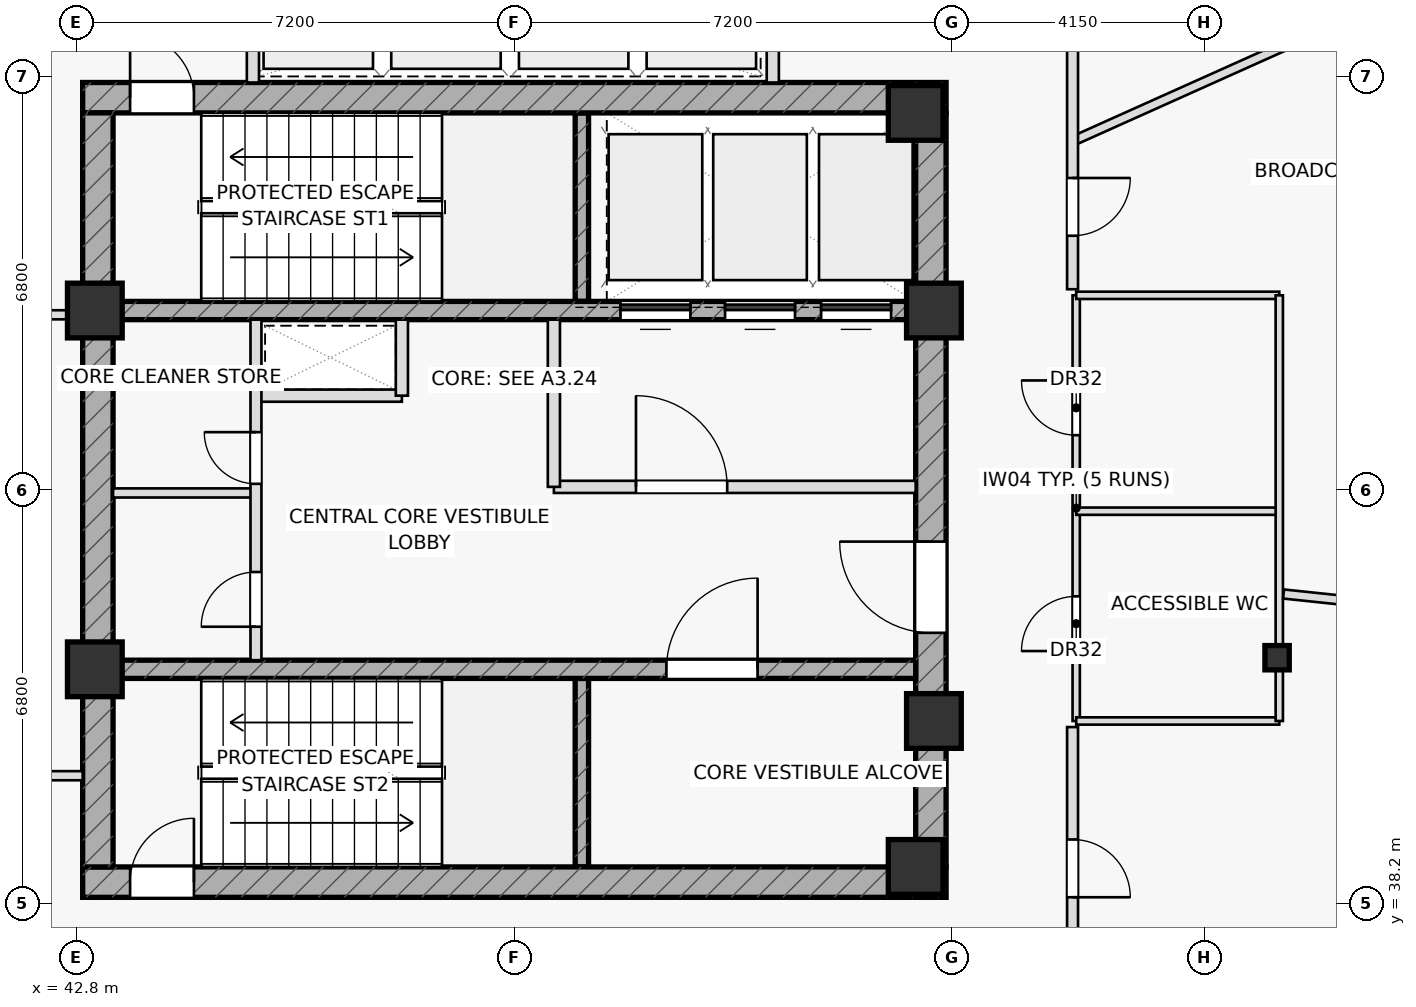
"""IFC4 building model, lengths in metres.
Left out: names, types, materials, properties, quantities, classifications, styles, units other than length and angle.
Written with IfcOpenShell. Run it as: python <this file> out.ifc"""

import sys

from ifc_helpers import new_model, si_unit, direction, frame, frame_2d, origin, origin_2d, place, context, subcontext, project, spatial, rectangle, hollow_rectangle, extrude, element, fill, save


model = new_model("IFC4")
c1 = context("Model", 3, precision=1e-05, world=origin(), true_north=direction((0.0, 1.0)))
c2 = subcontext(c1, "Body", "Model", "MODEL_VIEW")
j1 = project(units=[si_unit("LENGTHUNIT", "METRE"), si_unit("PLANEANGLEUNIT", "RADIAN")], contexts=[c1])
p1 = place(None, origin())
s1 = spatial("IfcSite", under=j1, at=p1, CompositionType="ELEMENT")
p2 = place(p1, origin())
s2 = spatial("IfcBuilding", under=s1, at=p2, CompositionType="ELEMENT")
p3 = place(p2, frame((0.0, 0.0, 309.5)))
s3 = spatial("IfcBuildingStorey", under=s2, at=p3, CompositionType="ELEMENT", Elevation=309.5)
for number, where, z_axis, x_axis in (
    (1, (51.11, 48.1, 0.0), (0.0, 0.0, 1.0), (0.0, 1.0, 0.0)),
    (2, (51.11, 38.8, 0.0), (0.0, 0.0, 1.0), (0.0, 1.0, 0.0)),
):
    element("IfcWall", number, at=place(p3, frame(where, z_axis=z_axis, x_axis=x_axis)), inside=s3, PredefinedType="SHEAR", context=c2, shape_type="SweptSolid", body=[
        extrude(rectangle(XDim=3.1, YDim=0.22, at=frame_2d((1.55, 0.0))), origin(), (0.0, 0.0, 1.0), 3.7),
    ])
p4 = place(p3, frame((42.9, 51.45, 0.0), z_axis=(0.0, 0.0, 1.0), x_axis=(1.0, 0.0, 0.0)))
e3 = element("IfcWall", 3, at=p4, inside=s3, PredefinedType="SHEAR", context=c2, shape_type="SweptSolid", body=[
    extrude(rectangle(XDim=14.2, YDim=0.5, at=frame_2d((7.1, 0.0))), origin(), (0.0, 0.0, 1.0), 3.7),
])
p5 = place(p4, frame((0.78, 0.0, 0.0)))
e4 = element("IfcOpeningElement", 4, at=p5, cuts=e3, PredefinedType="OPENING", context=c2, shape_type="SweptSolid", body=[
    extrude(rectangle(XDim=1.05, YDim=2.2, at=frame_2d((0.525, 1.1))), frame((0.0, 0.26, 0.0), z_axis=(0.0, -1.0, 0.0), x_axis=(1.0, 0.0, 0.0)), (0.0, 0.0, 1.0), 0.52),
])
p6 = place(p3, frame((42.9, 38.55, 0.0), z_axis=(0.0, 0.0, 1.0), x_axis=(1.0, 0.0, 0.0)))
e5 = element("IfcWall", 5, at=p6, inside=s3, PredefinedType="SHEAR", context=c2, shape_type="SweptSolid", body=[
    extrude(rectangle(XDim=14.2, YDim=0.5, at=frame_2d((7.1, 0.0))), origin(), (0.0, 0.0, 1.0), 3.7),
])
p7 = place(p6, frame((0.78, 0.0, 0.0)))
e6 = element("IfcOpeningElement", 6, at=p7, cuts=e5, PredefinedType="OPENING", context=c2, shape_type="SweptSolid", body=[
    extrude(rectangle(XDim=1.05, YDim=2.2, at=frame_2d((0.525, 1.1))), frame((0.0, 0.26, 0.0), z_axis=(0.0, -1.0, 0.0), x_axis=(1.0, 0.0, 0.0)), (0.0, 0.0, 1.0), 0.52),
])
p8 = place(p3, frame((43.15, 38.8, 0.0), z_axis=(0.0, 0.0, 1.0), x_axis=(0.0, 1.0, 0.0)))
e7 = element("IfcWall", 7, at=p8, inside=s3, PredefinedType="SHEAR", context=c2, shape_type="SweptSolid", body=[
    extrude(rectangle(XDim=12.4, YDim=0.5, at=frame_2d((6.2, 0.0))), origin(), (0.0, 0.0, 1.0), 3.7),
])
p9 = place(p3, frame((56.85, 38.8, 0.0), z_axis=(0.0, 0.0, 1.0), x_axis=(0.0, 1.0, 0.0)))
e8 = element("IfcWall", 8, at=p9, inside=s3, PredefinedType="SHEAR", context=c2, shape_type="SweptSolid", body=[
    extrude(rectangle(XDim=12.4, YDim=0.5, at=frame_2d((6.2, 0.0))), origin(), (0.0, 0.0, 1.0), 3.7),
])
p10 = place(p9, frame((3.85, 0.0, 0.0)))
e9 = element("IfcOpeningElement", 9, at=p10, cuts=e8, PredefinedType="OPENING", context=c2, shape_type="SweptSolid", body=[
    extrude(rectangle(XDim=1.5, YDim=2.2, at=frame_2d((0.75, 1.1))), frame((0.0, 0.26, 0.0), z_axis=(0.0, -1.0, 0.0), x_axis=(1.0, 0.0, 0.0)), (0.0, 0.0, 1.0), 0.52),
])
p11 = place(p3, frame((43.4, 47.95, 0.0), z_axis=(0.0, 0.0, 1.0), x_axis=(1.0, 0.0, 0.0)))
e10 = element("IfcWall", 10, at=p11, inside=s3, PredefinedType="SHEAR", context=c2, shape_type="SweptSolid", body=[
    extrude(rectangle(XDim=13.2, YDim=0.3, at=frame_2d((6.6, 0.0))), origin(), (0.0, 0.0, 1.0), 3.7),
])
p12 = place(p11, frame((8.345, 0.0, 0.0)))
e11 = element("IfcOpeningElement", 11, at=p12, cuts=e10, PredefinedType="OPENING", context=c2, shape_type="SweptSolid", body=[
    extrude(rectangle(XDim=1.15, YDim=2.2, at=frame_2d((0.575, 1.1))), frame((0.0, 0.16, 0.0), z_axis=(0.0, -1.0, 0.0), x_axis=(1.0, 0.0, 0.0)), (0.0, 0.0, 1.0), 0.32),
])
p13 = place(p11, frame((10.065, 0.0, 0.0)))
e12 = element("IfcOpeningElement", 12, at=p13, cuts=e10, PredefinedType="OPENING", context=c2, shape_type="SweptSolid", body=[
    extrude(rectangle(XDim=1.15, YDim=2.2, at=frame_2d((0.575, 1.1))), frame((0.0, 0.16, 0.0), z_axis=(0.0, -1.0, 0.0), x_axis=(1.0, 0.0, 0.0)), (0.0, 0.0, 1.0), 0.32),
])
p14 = place(p11, frame((11.645, 0.0, 0.0)))
e13 = element("IfcOpeningElement", 13, at=p14, cuts=e10, PredefinedType="OPENING", context=c2, shape_type="SweptSolid", body=[
    extrude(rectangle(XDim=1.15, YDim=2.2, at=frame_2d((0.575, 1.1))), frame((0.0, 0.16, 0.0), z_axis=(0.0, -1.0, 0.0), x_axis=(1.0, 0.0, 0.0)), (0.0, 0.0, 1.0), 0.32),
])
p15 = place(p3, frame((43.4, 42.05, 0.0), z_axis=(0.0, 0.0, 1.0), x_axis=(1.0, 0.0, 0.0)))
e14 = element("IfcWall", 14, at=p15, inside=s3, PredefinedType="SHEAR", context=c2, shape_type="SweptSolid", body=[
    extrude(rectangle(XDim=13.2, YDim=0.3, at=frame_2d((6.6, 0.0))), origin(), (0.0, 0.0, 1.0), 3.7),
])
p16 = place(p15, frame((9.1, 0.0, 0.0)))
e15 = element("IfcOpeningElement", 15, at=p16, cuts=e14, PredefinedType="OPENING", context=c2, shape_type="SweptSolid", body=[
    extrude(rectangle(XDim=1.5, YDim=2.2, at=frame_2d((0.75, 1.1))), frame((0.0, 0.16, 0.0), z_axis=(0.0, -1.0, 0.0), x_axis=(1.0, 0.0, 0.0)), (0.0, 0.0, 1.0), 0.32),
])
for number, where, z_axis, x_axis in (
    (16, (43.1, 47.95, 0.0), (0.0, 0.0, 1.0), (1.0, 0.0, 0.0)),
    (17, (56.9, 47.95, 0.0), (0.0, 0.0, 1.0), (1.0, 0.0, 0.0)),
    (18, (56.6, 51.2, 0.0), (0.0, 0.0, 1.0), (1.0, 0.0, 0.0)),
    (19, (43.1, 42.05, 0.0), (0.0, 0.0, 1.0), (1.0, 0.0, 0.0)),
    (20, (56.9, 41.2, 0.0), (0.0, 0.0, 1.0), (1.0, 0.0, 0.0)),
    (21, (56.6, 38.8, 0.0), (0.0, 0.0, 1.0), (1.0, 0.0, 0.0)),
):
    element("IfcColumn", number, at=place(p3, frame(where, z_axis=z_axis, x_axis=x_axis)), inside=s3, PredefinedType="COLUMN", context=c2, shape_type="SweptSolid", body=[
        extrude(rectangle(XDim=0.9, YDim=0.9, at=origin_2d()), origin(), (0.0, 0.0, 1.0), 3.7),
    ])
p17 = place(p3, frame((62.544, 42.24, 0.0), z_axis=(0.0, 0.0, 1.0), x_axis=(1.0, 0.0, 0.0)))
e22 = element("IfcColumn", 22, at=p17, inside=s3, PredefinedType="COLUMN", context=c2, shape_type="SweptSolid", body=[
    extrude(hollow_rectangle(XDim=0.4, YDim=0.4, WallThickness=0.025, at=origin_2d()), origin(), (0.0, 0.0, 1.0), 3.7),
])
for number, where, z_axis, x_axis in (
    (23, (45.7, 51.7, 0.0), (0.0, 0.0, 1.0), (0.0, 1.0, 0.0)),
    (24, (54.25, 51.7, 0.0), (0.0, 0.0, 1.0), (0.0, 1.0, 0.0)),
):
    element("IfcWall", number, at=place(p3, frame(where, z_axis=z_axis, x_axis=x_axis)), inside=s3, PredefinedType="PARTITIONING", context=c2, shape_type="SweptSolid", body=[
        extrude(rectangle(XDim=2.6, YDim=0.2, at=frame_2d((1.3, 0.0))), origin(), (0.0, 0.0, 1.0), 3.7),
    ])
p18 = place(p3, frame((45.75, 46.55, 0.0), z_axis=(0.0, 0.0, 1.0), x_axis=(1.0, 0.0, 0.0)))
e25 = element("IfcWall", 25, at=p18, inside=s3, PredefinedType="PARTITIONING", context=c2, shape_type="SweptSolid", body=[
    extrude(rectangle(XDim=2.4, YDim=0.2, at=frame_2d((1.2, 0.0))), origin(), (0.0, 0.0, 1.0), 3.7),
])
p19 = place(p3, frame((48.15, 46.55, 0.0), z_axis=(0.0, 0.0, 1.0), x_axis=(0.0, 1.0, 0.0)))
e26 = element("IfcWall", 26, at=p19, inside=s3, PredefinedType="PARTITIONING", context=c2, shape_type="SweptSolid", body=[
    extrude(rectangle(XDim=1.25, YDim=0.2, at=frame_2d((0.625, 0.0))), origin(), (0.0, 0.0, 1.0), 3.7),
])
p20 = place(p3, frame((50.65, 45.05, 0.0), z_axis=(0.0, 0.0, 1.0), x_axis=(1.0, 0.0, 0.0)))
e27 = element("IfcWall", 27, at=p20, inside=s3, PredefinedType="PARTITIONING", context=c2, shape_type="SweptSolid", body=[
    extrude(rectangle(XDim=5.95, YDim=0.2, at=frame_2d((2.975, 0.0))), origin(), (0.0, 0.0, 1.0), 3.7),
])
p21 = place(p20, frame((1.35, 0.0, 0.0)))
e28 = element("IfcOpeningElement", 28, at=p21, cuts=e27, PredefinedType="OPENING", context=c2, shape_type="SweptSolid", body=[
    extrude(rectangle(XDim=1.5, YDim=2.2, at=frame_2d((0.75, 1.1))), frame((0.0, 0.11, 0.0), z_axis=(0.0, -1.0, 0.0), x_axis=(1.0, 0.0, 0.0)), (0.0, 0.0, 1.0), 0.22),
])
p22 = place(p3, frame((50.65, 45.05, 0.0), z_axis=(0.0, 0.0, 1.0), x_axis=(0.0, 1.0, 0.0)))
e29 = element("IfcWall", 29, at=p22, inside=s3, PredefinedType="PARTITIONING", context=c2, shape_type="SweptSolid", body=[
    extrude(rectangle(XDim=2.75, YDim=0.2, at=frame_2d((1.375, 0.0))), origin(), (0.0, 0.0, 1.0), 3.7),
])
p23 = place(p3, frame((43.4, 44.95, 0.0), z_axis=(0.0, 0.0, 1.0), x_axis=(1.0, 0.0, 0.0)))
e30 = element("IfcWall", 30, at=p23, inside=s3, PredefinedType="PARTITIONING", context=c2, shape_type="SweptSolid", body=[
    extrude(rectangle(XDim=2.35, YDim=0.15, at=frame_2d((1.175, 0.0))), origin(), (0.0, 0.0, 1.0), 3.7),
])
p24 = place(p3, frame((45.75, 42.2, 0.0), z_axis=(0.0, 0.0, 1.0), x_axis=(0.0, 1.0, 0.0)))
e31 = element("IfcWall", 31, at=p24, inside=s3, PredefinedType="PARTITIONING", context=c2, shape_type="SweptSolid", body=[
    extrude(rectangle(XDim=5.6, YDim=0.18, at=frame_2d((2.8, 0.0))), origin(), (0.0, 0.0, 1.0), 3.7),
])
p25 = place(p24, frame((0.55, 0.0, 0.0)))
e32 = element("IfcOpeningElement", 32, at=p25, cuts=e31, PredefinedType="OPENING", context=c2, shape_type="SweptSolid", body=[
    extrude(rectangle(XDim=0.9, YDim=2.05, at=frame_2d((0.45, 1.025))), frame((0.0, 0.1, 0.0), z_axis=(0.0, -1.0, 0.0), x_axis=(1.0, 0.0, 0.0)), (0.0, 0.0, 1.0), 0.2),
])
p26 = place(p24, frame((2.9, 0.0, 0.0)))
e33 = element("IfcOpeningElement", 33, at=p26, cuts=e31, PredefinedType="OPENING", context=c2, shape_type="SweptSolid", body=[
    extrude(rectangle(XDim=0.85, YDim=2.05, at=frame_2d((0.425, 1.025))), frame((0.0, 0.1, 0.0), z_axis=(0.0, -1.0, 0.0), x_axis=(1.0, 0.0, 0.0)), (0.0, 0.0, 1.0), 0.2),
])
p27 = place(p3, frame((37.14, 40.3, 0.0), z_axis=(0.0, 0.0, 1.0), x_axis=(1.0, 0.0, 0.0)))
e34 = element("IfcWall", 34, at=p27, inside=s3, PredefinedType="PARTITIONING", context=c2, shape_type="SweptSolid", body=[
    extrude(rectangle(XDim=5.76, YDim=0.15, at=frame_2d((2.88, 0.0))), origin(), (0.0, 0.0, 1.0), 3.225),
])
p28 = place(p27, frame((3.21, 0.0, 0.0)))
e35 = element("IfcOpeningElement", 35, at=p28, cuts=e34, PredefinedType="OPENING", context=c2, shape_type="SweptSolid", body=[
    extrude(rectangle(XDim=0.95, YDim=2.05, at=frame_2d((0.475, 1.025))), frame((0.0, 0.085, 0.0), z_axis=(0.0, -1.0, 0.0), x_axis=(1.0, 0.0, 0.0)), (0.0, 0.0, 1.0), 0.17),
])
p29 = place(p3, frame((37.14, 47.88, 0.0), z_axis=(0.0, 0.0, 1.0), x_axis=(1.0, 0.0, 0.0)))
e36 = element("IfcWall", 36, at=p29, inside=s3, PredefinedType="PARTITIONING", context=c2, shape_type="SweptSolid", body=[
    extrude(rectangle(XDim=5.76, YDim=0.15, at=frame_2d((2.88, 0.0))), origin(), (0.0, 0.0, 1.0), 3.7),
])
p30 = place(p3, frame((59.24, 41.2, 0.0), z_axis=(0.0, 0.0, 1.0), x_axis=(0.0, 1.0, 0.0)))
e37 = element("IfcWall", 37, at=p30, inside=s3, PredefinedType="PARTITIONING", context=c2, shape_type="SweptSolid", body=[
    extrude(rectangle(XDim=7.0, YDim=0.12, at=frame_2d((3.5, 0.0))), origin(), (0.0, 0.0, 1.0), 3.7),
])
p31 = place(p30, frame((1.15, 0.0, 0.0)))
e38 = element("IfcOpeningElement", 38, at=p31, cuts=e37, PredefinedType="OPENING", context=c2, shape_type="SweptSolid", body=[
    extrude(rectangle(XDim=0.9, YDim=2.05, at=frame_2d((0.45, 1.025))), frame((0.0, 0.07, 0.0), z_axis=(0.0, -1.0, 0.0), x_axis=(1.0, 0.0, 0.0)), (0.0, 0.0, 1.0), 0.14),
])
p32 = place(p30, frame((4.7, 0.0, 0.0)))
e39 = element("IfcOpeningElement", 39, at=p32, cuts=e37, PredefinedType="OPENING", context=c2, shape_type="SweptSolid", body=[
    extrude(rectangle(XDim=0.9, YDim=2.05, at=frame_2d((0.45, 1.025))), frame((0.0, 0.07, 0.0), z_axis=(0.0, -1.0, 0.0), x_axis=(1.0, 0.0, 0.0)), (0.0, 0.0, 1.0), 0.14),
])
p33 = place(p3, frame((59.24, 41.2, 0.0), z_axis=(0.0, 0.0, 1.0), x_axis=(1.0, 0.0, 0.0)))
e40 = element("IfcWall", 40, at=p33, inside=s3, PredefinedType="PARTITIONING", context=c2, shape_type="SweptSolid", body=[
    extrude(rectangle(XDim=3.34, YDim=0.12, at=frame_2d((1.67, 0.0))), origin(), (0.0, 0.0, 1.0), 3.225),
])
for number, where, z_axis, x_axis in (
    (41, (59.24, 44.65, 0.0), (0.0, 0.0, 1.0), (1.0, 0.0, 0.0)),
    (42, (59.24, 48.2, 0.0), (0.0, 0.0, 1.0), (1.0, 0.0, 0.0)),
):
    element("IfcWall", number, at=place(p3, frame(where, z_axis=z_axis, x_axis=x_axis)), inside=s3, PredefinedType="PARTITIONING", context=c2, shape_type="SweptSolid", body=[
        extrude(rectangle(XDim=3.34, YDim=0.12, at=frame_2d((1.67, 0.0))), origin(), (0.0, 0.0, 1.0), 3.7),
    ])
p34 = place(p3, frame((62.58, 41.2, 0.0), z_axis=(0.0, 0.0, 1.0), x_axis=(0.0, 1.0, 0.0)))
e43 = element("IfcWall", 43, at=p34, inside=s3, PredefinedType="PARTITIONING", context=c2, shape_type="SweptSolid", body=[
    extrude(rectangle(XDim=7.0, YDim=0.12, at=frame_2d((3.5, 0.0))), origin(), (0.0, 0.0, 1.0), 3.275),
])
p35 = place(p3, frame((62.65, 43.288, 0.0), z_axis=(0.0, 0.0, 1.0), x_axis=(0.99449896567, -0.104746395075, 0.0)))
e44 = element("IfcWall", 44, at=p35, inside=s3, PredefinedType="PARTITIONING", context=c2, shape_type="SweptSolid", body=[
    extrude(rectangle(XDim=4.125, YDim=0.15, at=frame_2d((2.063, 0.0))), origin(), (0.0, 0.0, 1.0), 3.7),
])
p36 = place(p3, frame((59.18, 50.735, 0.0), z_axis=(0.0, 0.0, 1.0), x_axis=(0.912351299783, 0.40940823854, 0.0)))
e45 = element("IfcWall", 45, at=p36, inside=s3, PredefinedType="PARTITIONING", context=c2, shape_type="SweptSolid", body=[
    extrude(rectangle(XDim=9.311, YDim=0.15, at=frame_2d((4.655, 0.0))), origin(), (0.0, 0.0, 1.0), 3.275),
])
p37 = place(p3, frame((59.18, 53.83, 0.0), z_axis=(0.0, 0.0, 1.0), x_axis=(0.0, -1.0, 0.0)))
e46 = element("IfcWall", 46, at=p37, inside=s3, PredefinedType="PARTITIONING", context=c2, shape_type="SweptSolid", body=[
    extrude(rectangle(XDim=5.53, YDim=0.18, at=frame_2d((2.765, 0.0))), origin(), (0.0, 0.0, 1.0), 3.7),
])
p38 = place(p37, frame((3.7, 0.0, 0.0)))
e47 = element("IfcOpeningElement", 47, at=p38, cuts=e46, PredefinedType="OPENING", context=c2, shape_type="SweptSolid", body=[
    extrude(rectangle(XDim=0.95, YDim=2.05, at=frame_2d((0.475, 1.025))), frame((0.0, 0.1, 0.0), z_axis=(0.0, -1.0, 0.0), x_axis=(1.0, 0.0, 0.0)), (0.0, 0.0, 1.0), 0.2),
])
p39 = place(p3, frame((59.18, 41.1, 0.0), z_axis=(0.0, 0.0, 1.0), x_axis=(0.0, -1.0, 0.0)))
e48 = element("IfcWall", 48, at=p39, inside=s3, PredefinedType="PARTITIONING", context=c2, shape_type="SweptSolid", body=[
    extrude(rectangle(XDim=4.93, YDim=0.18, at=frame_2d((2.465, 0.0))), origin(), (0.0, 0.0, 1.0), 3.475),
])
p40 = place(p39, frame((1.849, 0.0, 0.0)))
e49 = element("IfcOpeningElement", 49, at=p40, cuts=e48, PredefinedType="OPENING", context=c2, shape_type="SweptSolid", body=[
    extrude(rectangle(XDim=0.95, YDim=2.05, at=frame_2d((0.475, 1.025))), frame((0.0, 0.1, 0.0), z_axis=(0.0, -1.0, 0.0), x_axis=(1.0, 0.0, 0.0)), (0.0, 0.0, 1.0), 0.2),
])
p41 = place(p5, origin())
e50 = element("IfcDoor", 50, at=p41, inside=s3, OperationType="SINGLE_SWING_LEFT", PredefinedType="DOOR", context=c2, shape_type="SweptSolid", body=[
    extrude(rectangle(XDim=1.05, YDim=2.2, at=frame_2d((0.525, 1.1))), frame((0.0, 0.025, 0.0), z_axis=(0.0, -1.0, 0.0), x_axis=(1.0, 0.0, 0.0)), (0.0, 0.0, 1.0), 0.05),
])
fill(e4, e50)
p42 = place(p7, origin())
e51 = element("IfcDoor", 51, at=p42, inside=s3, OperationType="SINGLE_SWING_RIGHT", PredefinedType="DOOR", context=c2, shape_type="SweptSolid", body=[
    extrude(rectangle(XDim=1.05, YDim=2.2, at=frame_2d((0.525, 1.1))), frame((0.0, 0.025, 0.0), z_axis=(0.0, -1.0, 0.0), x_axis=(1.0, 0.0, 0.0)), (0.0, 0.0, 1.0), 0.05),
])
fill(e6, e51)
p43 = place(p10, origin())
e52 = element("IfcDoor", 52, at=p43, inside=s3, OperationType="SINGLE_SWING_RIGHT", PredefinedType="DOOR", context=c2, shape_type="SweptSolid", body=[
    extrude(rectangle(XDim=1.5, YDim=2.2, at=frame_2d((0.75, 1.1))), frame((0.0, 0.025, 0.0), z_axis=(0.0, -1.0, 0.0), x_axis=(1.0, 0.0, 0.0)), (0.0, 0.0, 1.0), 0.05),
])
fill(e9, e52)
p44 = place(p21, origin())
e53 = element("IfcDoor", 53, at=p44, inside=s3, OperationType="SINGLE_SWING_LEFT", PredefinedType="DOOR", context=c2, shape_type="SweptSolid", body=[
    extrude(rectangle(XDim=1.5, YDim=2.2, at=frame_2d((0.75, 1.1))), frame((0.0, 0.025, 0.0), z_axis=(0.0, -1.0, 0.0), x_axis=(1.0, 0.0, 0.0)), (0.0, 0.0, 1.0), 0.05),
])
fill(e28, e53)
p45 = place(p16, origin())
e54 = element("IfcDoor", 54, at=p45, inside=s3, OperationType="SINGLE_SWING_RIGHT", PredefinedType="DOOR", context=c2, shape_type="SweptSolid", body=[
    extrude(rectangle(XDim=1.5, YDim=2.2, at=frame_2d((0.75, 1.1))), frame((0.0, 0.025, 0.0), z_axis=(0.0, -1.0, 0.0), x_axis=(1.0, 0.0, 0.0)), (0.0, 0.0, 1.0), 0.05),
])
fill(e15, e54)
p46 = place(p25, origin())
e55 = element("IfcDoor", 55, at=p46, inside=s3, OperationType="SINGLE_SWING_LEFT", PredefinedType="DOOR", context=c2, shape_type="SweptSolid", body=[
    extrude(rectangle(XDim=0.9, YDim=2.05, at=frame_2d((0.45, 1.025))), frame((0.0, 0.025, 0.0), z_axis=(0.0, -1.0, 0.0), x_axis=(1.0, 0.0, 0.0)), (0.0, 0.0, 1.0), 0.05),
])
fill(e32, e55)
p47 = place(p26, origin())
e56 = element("IfcDoor", 56, at=p47, inside=s3, OperationType="SINGLE_SWING_RIGHT", PredefinedType="DOOR", context=c2, shape_type="SweptSolid", body=[
    extrude(rectangle(XDim=0.85, YDim=2.05, at=frame_2d((0.425, 1.025))), frame((0.0, 0.025, 0.0), z_axis=(0.0, -1.0, 0.0), x_axis=(1.0, 0.0, 0.0)), (0.0, 0.0, 1.0), 0.05),
])
fill(e33, e56)
p48 = place(p31, origin())
e57 = element("IfcDoor", 57, at=p48, inside=s3, OperationType="SINGLE_SWING_LEFT", PredefinedType="DOOR", context=c2, shape_type="SweptSolid", body=[
    extrude(rectangle(XDim=0.9, YDim=2.05, at=frame_2d((0.45, 1.025))), frame((0.0, 0.025, 0.0), z_axis=(0.0, -1.0, 0.0), x_axis=(1.0, 0.0, 0.0)), (0.0, 0.0, 1.0), 0.05),
])
fill(e38, e57)
p49 = place(p32, origin())
e58 = element("IfcDoor", 58, at=p49, inside=s3, OperationType="SINGLE_SWING_RIGHT", PredefinedType="DOOR", context=c2, shape_type="SweptSolid", body=[
    extrude(rectangle(XDim=0.9, YDim=2.05, at=frame_2d((0.45, 1.025))), frame((0.0, 0.025, 0.0), z_axis=(0.0, -1.0, 0.0), x_axis=(1.0, 0.0, 0.0)), (0.0, 0.0, 1.0), 0.05),
])
fill(e39, e58)
p50 = place(p38, origin())
e59 = element("IfcDoor", 59, at=p50, inside=s3, OperationType="SINGLE_SWING_LEFT", PredefinedType="DOOR", context=c2, shape_type="SweptSolid", body=[
    extrude(rectangle(XDim=0.95, YDim=2.05, at=frame_2d((0.475, 1.025))), frame((0.0, 0.025, 0.0), z_axis=(0.0, -1.0, 0.0), x_axis=(1.0, 0.0, 0.0)), (0.0, 0.0, 1.0), 0.05),
])
fill(e47, e59)
p51 = place(p40, origin())
e60 = element("IfcDoor", 60, at=p51, inside=s3, OperationType="SINGLE_SWING_RIGHT", PredefinedType="DOOR", context=c2, shape_type="SweptSolid", body=[
    extrude(rectangle(XDim=0.95, YDim=2.05, at=frame_2d((0.475, 1.025))), frame((0.0, 0.025, 0.0), z_axis=(0.0, -1.0, 0.0), x_axis=(1.0, 0.0, 0.0)), (0.0, 0.0, 1.0), 0.05),
])
fill(e49, e60)
p52 = place(p12, origin())
e61 = element("IfcDoor", 61, at=p52, inside=s3, OperationType="SLIDING_TO_LEFT", PredefinedType="DOOR", context=c2, shape_type="SweptSolid", body=[
    extrude(rectangle(XDim=1.15, YDim=2.2, at=frame_2d((0.575, 1.1))), frame((0.0, 0.025, 0.0), z_axis=(0.0, -1.0, 0.0), x_axis=(1.0, 0.0, 0.0)), (0.0, 0.0, 1.0), 0.05),
])
fill(e11, e61)
p53 = place(p13, origin())
e62 = element("IfcDoor", 62, at=p53, inside=s3, OperationType="SLIDING_TO_LEFT", PredefinedType="DOOR", context=c2, shape_type="SweptSolid", body=[
    extrude(rectangle(XDim=1.15, YDim=2.2, at=frame_2d((0.575, 1.1))), frame((0.0, 0.025, 0.0), z_axis=(0.0, -1.0, 0.0), x_axis=(1.0, 0.0, 0.0)), (0.0, 0.0, 1.0), 0.05),
])
fill(e12, e62)
p54 = place(p14, origin())
e63 = element("IfcDoor", 63, at=p54, inside=s3, OperationType="SLIDING_TO_LEFT", PredefinedType="DOOR", context=c2, shape_type="SweptSolid", body=[
    extrude(rectangle(XDim=1.15, YDim=2.2, at=frame_2d((0.575, 1.1))), frame((0.0, 0.025, 0.0), z_axis=(0.0, -1.0, 0.0), x_axis=(1.0, 0.0, 0.0)), (0.0, 0.0, 1.0), 0.05),
])
fill(e13, e63)
save(model, sys.argv[1])
